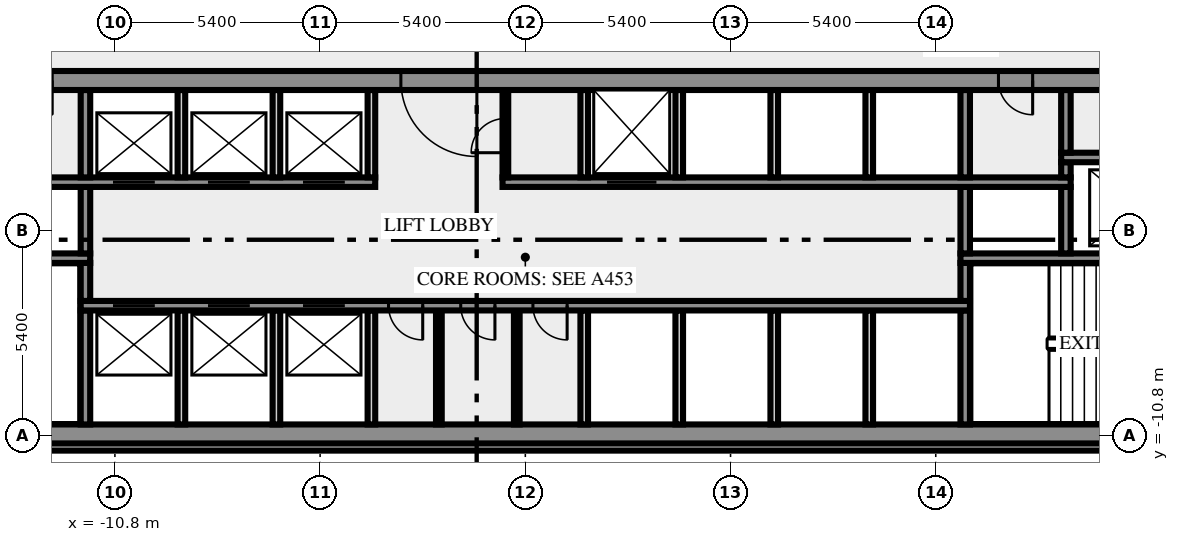
"""IFC4 building model, lengths in metres.
Left out: names, types, materials, properties, quantities, classifications, styles, units other than length and angle.
Written with IfcOpenShell. Run it as: python <this file> out.ifc"""

import sys

from ifc_helpers import new_model, si_unit, direction, frame, frame_2d, origin, place, context, subcontext, project, spatial, rectangle, extrude, element, fill, save


model = new_model("IFC4")
c1 = context("Model", 3, precision=1e-05, world=origin(), true_north=direction((0.0, 1.0)))
c2 = subcontext(c1, "Body", "Model", "MODEL_VIEW")
j1 = project(units=[si_unit("LENGTHUNIT", "METRE"), si_unit("PLANEANGLEUNIT", "RADIAN")], contexts=[c1])
p1 = place(None, origin())
s1 = spatial("IfcSite", under=j1, at=p1, CompositionType="ELEMENT")
p2 = place(p1, origin())
s2 = spatial("IfcBuilding", under=s1, at=p2, CompositionType="ELEMENT")
p3 = place(p2, frame((0.0, 0.0, 39.0)))
s3 = spatial("IfcBuildingStorey", under=s2, at=p3, CompositionType="ELEMENT", Elevation=39.0)
p4 = place(p3, frame((-17.444, -11.088, 0.0), z_axis=(0.0, 0.0, 1.0), x_axis=(1.0, 0.0, 0.0)))
e1 = element("IfcWall", 1, at=p4, inside=s3, PredefinedType="SOLIDWALL", context=c2, shape_type="SweptSolid", body=[
    extrude(rectangle(XDim=34.888, YDim=0.2, at=frame_2d((17.444, 0.0))), origin(), (0.0, 0.0, 1.0), 3.65),
])
p5 = place(p3, frame((-20.0, -10.75, 0.0), z_axis=(0.0, 0.0, 1.0), x_axis=(1.0, 0.0, 0.0)))
e2 = element("IfcWall", 2, at=p5, inside=s3, PredefinedType="SHEAR", context=c2, shape_type="SweptSolid", body=[
    extrude(rectangle(XDim=40.0, YDim=0.5, at=frame_2d((20.0, 0.0))), origin(), (0.0, 0.0, 1.0), 3.65),
])
p6 = place(p5, frame((0.8, 0.0, 1.0)))
e3 = element("IfcOpeningElement", 3, at=p6, cuts=e2, PredefinedType="OPENING", context=c2, shape_type="SweptSolid", body=[
    extrude(rectangle(XDim=1.2, YDim=1.2, at=frame_2d((0.6, 0.6))), frame((0.0, 0.26, 0.0), z_axis=(0.0, -1.0, 0.0), x_axis=(1.0, 0.0, 0.0)), (0.0, 0.0, 1.0), 0.52),
])
p7 = place(p5, frame((38.0, 0.0, 1.0)))
e4 = element("IfcOpeningElement", 4, at=p7, cuts=e2, PredefinedType="OPENING", context=c2, shape_type="SweptSolid", body=[
    extrude(rectangle(XDim=1.2, YDim=1.2, at=frame_2d((0.6, 0.6))), frame((0.0, 0.26, 0.0), z_axis=(0.0, -1.0, 0.0), x_axis=(1.0, 0.0, 0.0)), (0.0, 0.0, 1.0), 0.52),
])
p8 = place(p3, frame((-11.575, -10.5, 0.0), z_axis=(0.0, 0.0, 1.0), x_axis=(0.0, 1.0, 0.0)))
e5 = element("IfcWall", 5, at=p8, inside=s3, PredefinedType="SHEAR", context=c2, shape_type="SweptSolid", body=[
    extrude(rectangle(XDim=3.0, YDim=0.25, at=frame_2d((1.5, 0.0))), origin(), (0.0, 0.0, 1.0), 3.65),
])
for number, where, z_axis, x_axis in (
    (6, (-9.05, -10.5, 0.0), (0.0, 0.0, 1.0), (0.0, 1.0, 0.0)),
    (7, (-6.55, -10.5, 0.0), (0.0, 0.0, 1.0), (0.0, 1.0, 0.0)),
    (8, (-4.05, -10.5, 0.0), (0.0, 0.0, 1.0), (0.0, 1.0, 0.0)),
):
    element("IfcWall", number, at=place(p3, frame(where, z_axis=z_axis, x_axis=x_axis)), inside=s3, PredefinedType="SOLIDWALL", context=c2, shape_type="SweptSolid", body=[
        extrude(rectangle(XDim=3.0, YDim=0.2, at=frame_2d((1.5, 0.0))), origin(), (0.0, 0.0, 1.0), 3.65),
    ])
for number, where, z_axis, x_axis in (
    (9, (-2.275, -10.5, 0.0), (0.0, 0.0, 1.0), (0.0, 1.0, 0.0)),
    (10, (-0.225, -10.5, 0.0), (0.0, 0.0, 1.0), (0.0, 1.0, 0.0)),
):
    element("IfcWall", number, at=place(p3, frame(where, z_axis=z_axis, x_axis=x_axis)), inside=s3, PredefinedType="PARTITIONING", context=c2, shape_type="SweptSolid", body=[
        extrude(rectangle(XDim=3.0, YDim=0.15, at=frame_2d((1.5, 0.0))), origin(), (0.0, 0.0, 1.0), 3.65),
    ])
for number, where, z_axis, x_axis in (
    (11, (1.55, -10.5, 0.0), (0.0, 0.0, 1.0), (0.0, 1.0, 0.0)),
    (12, (4.05, -10.5, 0.0), (0.0, 0.0, 1.0), (0.0, 1.0, 0.0)),
    (13, (6.55, -10.5, 0.0), (0.0, 0.0, 1.0), (0.0, 1.0, 0.0)),
    (14, (9.05, -10.5, 0.0), (0.0, 0.0, 1.0), (0.0, 1.0, 0.0)),
):
    element("IfcWall", number, at=place(p3, frame(where, z_axis=z_axis, x_axis=x_axis)), inside=s3, PredefinedType="SOLIDWALL", context=c2, shape_type="SweptSolid", body=[
        extrude(rectangle(XDim=3.0, YDim=0.2, at=frame_2d((1.5, 0.0))), origin(), (0.0, 0.0, 1.0), 3.65),
    ])
p9 = place(p3, frame((11.575, -10.5, 0.0), z_axis=(0.0, 0.0, 1.0), x_axis=(0.0, 1.0, 0.0)))
e15 = element("IfcWall", 15, at=p9, inside=s3, PredefinedType="SHEAR", context=c2, shape_type="SweptSolid", body=[
    extrude(rectangle(XDim=3.0, YDim=0.25, at=frame_2d((1.5, 0.0))), origin(), (0.0, 0.0, 1.0), 3.65),
])
p10 = place(p3, frame((11.7, -7.375, 0.0), z_axis=(0.0, 0.0, 1.0), x_axis=(-1.0, 0.0, 0.0)))
e16 = element("IfcWall", 16, at=p10, inside=s3, PredefinedType="SHEAR", context=c2, shape_type="SweptSolid", body=[
    extrude(rectangle(XDim=23.4, YDim=0.25, at=frame_2d((11.7, 0.0))), origin(), (0.0, 0.0, 1.0), 3.65),
])
p11 = place(p10, frame((21.45, 0.0, 0.0)))
e17 = element("IfcOpeningElement", 17, at=p11, cuts=e16, PredefinedType="OPENING", context=c2, shape_type="SweptSolid", body=[
    extrude(rectangle(XDim=1.1, YDim=2.1, at=frame_2d((0.55, 1.05))), frame((0.0, 0.135, 0.0), z_axis=(0.0, -1.0, 0.0), x_axis=(1.0, 0.0, 0.0)), (0.0, 0.0, 1.0), 0.27),
])
p12 = place(p10, frame((18.95, 0.0, 0.0)))
e18 = element("IfcOpeningElement", 18, at=p12, cuts=e16, PredefinedType="OPENING", context=c2, shape_type="SweptSolid", body=[
    extrude(rectangle(XDim=1.1, YDim=2.1, at=frame_2d((0.55, 1.05))), frame((0.0, 0.135, 0.0), z_axis=(0.0, -1.0, 0.0), x_axis=(1.0, 0.0, 0.0)), (0.0, 0.0, 1.0), 0.27),
])
p13 = place(p10, frame((16.45, 0.0, 0.0)))
e19 = element("IfcOpeningElement", 19, at=p13, cuts=e16, PredefinedType="OPENING", context=c2, shape_type="SweptSolid", body=[
    extrude(rectangle(XDim=1.1, YDim=2.1, at=frame_2d((0.55, 1.05))), frame((0.0, 0.135, 0.0), z_axis=(0.0, -1.0, 0.0), x_axis=(1.0, 0.0, 0.0)), (0.0, 0.0, 1.0), 0.27),
])
p14 = place(p10, frame((14.4, 0.0, 0.0)))
e20 = element("IfcOpeningElement", 20, at=p14, cuts=e16, PredefinedType="OPENING", context=c2, shape_type="SweptSolid", body=[
    extrude(rectangle(XDim=0.9, YDim=2.1, at=frame_2d((0.45, 1.05))), frame((0.0, 0.135, 0.0), z_axis=(0.0, -1.0, 0.0), x_axis=(1.0, 0.0, 0.0)), (0.0, 0.0, 1.0), 0.27),
])
p15 = place(p10, frame((12.5, 0.0, 0.0)))
e21 = element("IfcOpeningElement", 21, at=p15, cuts=e16, PredefinedType="OPENING", context=c2, shape_type="SweptSolid", body=[
    extrude(rectangle(XDim=0.9, YDim=2.1, at=frame_2d((0.45, 1.05))), frame((0.0, 0.135, 0.0), z_axis=(0.0, -1.0, 0.0), x_axis=(1.0, 0.0, 0.0)), (0.0, 0.0, 1.0), 0.27),
])
p16 = place(p10, frame((10.6, 0.0, 0.0)))
e22 = element("IfcOpeningElement", 22, at=p16, cuts=e16, PredefinedType="OPENING", context=c2, shape_type="SweptSolid", body=[
    extrude(rectangle(XDim=0.9, YDim=2.1, at=frame_2d((0.45, 1.05))), frame((0.0, 0.135, 0.0), z_axis=(0.0, -1.0, 0.0), x_axis=(1.0, 0.0, 0.0)), (0.0, 0.0, 1.0), 0.27),
])
for number, where, z_axis, x_axis in (
    (23, (-11.575, -7.25, 0.0), (0.0, 0.0, 1.0), (0.0, 1.0, 0.0)),
    (24, (11.575, -7.25, 0.0), (0.0, 0.0, 1.0), (0.0, 1.0, 0.0)),
):
    element("IfcWall", number, at=place(p3, frame(where, z_axis=z_axis, x_axis=x_axis)), inside=s3, PredefinedType="SHEAR", context=c2, shape_type="SweptSolid", body=[
        extrude(rectangle(XDim=1.0, YDim=0.25, at=frame_2d((0.5, 0.0))), origin(), (0.0, 0.0, 1.0), 3.65),
    ])
p17 = place(p3, frame((-11.45, -6.125, 0.0), z_axis=(0.0, 0.0, 1.0), x_axis=(-1.0, 0.0, 0.0)))
e25 = element("IfcWall", 25, at=p17, inside=s3, PredefinedType="SHEAR", context=c2, shape_type="SweptSolid", body=[
    extrude(rectangle(XDim=8.05, YDim=0.25, at=frame_2d((4.025, 0.0))), origin(), (0.0, 0.0, 1.0), 3.65),
])
p18 = place(p17, frame((6.2, 0.0, 0.0)))
e26 = element("IfcOpeningElement", 26, at=p18, cuts=e25, PredefinedType="OPENING", context=c2, shape_type="SweptSolid", body=[
    extrude(rectangle(XDim=1.8, YDim=2.1, at=frame_2d((0.9, 1.05))), frame((0.0, 0.135, 0.0), z_axis=(0.0, -1.0, 0.0), x_axis=(1.0, 0.0, 0.0)), (0.0, 0.0, 1.0), 0.27),
])
p19 = place(p3, frame((19.5, -6.125, 0.0), z_axis=(0.0, 0.0, 1.0), x_axis=(-1.0, 0.0, 0.0)))
e27 = element("IfcWall", 27, at=p19, inside=s3, PredefinedType="SHEAR", context=c2, shape_type="SweptSolid", body=[
    extrude(rectangle(XDim=8.05, YDim=0.25, at=frame_2d((4.025, 0.0))), origin(), (0.0, 0.0, 1.0), 3.65),
])
p20 = place(p19, frame((0.05, 0.0, 0.0)))
e28 = element("IfcOpeningElement", 28, at=p20, cuts=e27, PredefinedType="OPENING", context=c2, shape_type="SweptSolid", body=[
    extrude(rectangle(XDim=1.8, YDim=2.1, at=frame_2d((0.9, 1.05))), frame((0.0, 0.135, 0.0), z_axis=(0.0, -1.0, 0.0), x_axis=(1.0, 0.0, 0.0)), (0.0, 0.0, 1.0), 0.27),
])
for number, where, z_axis, x_axis in (
    (29, (-11.575, -6.0, 0.0), (0.0, 0.0, 1.0), (0.0, 1.0, 0.0)),
    (30, (11.575, -6.0, 0.0), (0.0, 0.0, 1.0), (0.0, 1.0, 0.0)),
    (31, (14.225, -6.0, 0.0), (0.0, 0.0, 1.0), (0.0, 1.0, 0.0)),
):
    element("IfcWall", number, at=place(p3, frame(where, z_axis=z_axis, x_axis=x_axis)), inside=s3, PredefinedType="SHEAR", context=c2, shape_type="SweptSolid", body=[
        extrude(rectangle(XDim=1.75, YDim=0.25, at=frame_2d((0.875, 0.0))), origin(), (0.0, 0.0, 1.0), 3.65),
    ])
p21 = place(p3, frame((-14.35, -4.125, 0.0), z_axis=(0.0, 0.0, 1.0), x_axis=(1.0, 0.0, 0.0)))
e32 = element("IfcWall", 32, at=p21, inside=s3, PredefinedType="SHEAR", context=c2, shape_type="SweptSolid", body=[
    extrude(rectangle(XDim=10.4, YDim=0.25, at=frame_2d((5.2, 0.0))), origin(), (0.0, 0.0, 1.0), 3.65),
])
p22 = place(p21, frame((3.5, 0.0, 0.0)))
e33 = element("IfcOpeningElement", 33, at=p22, cuts=e32, PredefinedType="OPENING", context=c2, shape_type="SweptSolid", body=[
    extrude(rectangle(XDim=1.1, YDim=2.1, at=frame_2d((0.55, 1.05))), frame((0.0, 0.135, 0.0), z_axis=(0.0, -1.0, 0.0), x_axis=(1.0, 0.0, 0.0)), (0.0, 0.0, 1.0), 0.27),
])
p23 = place(p21, frame((6.0, 0.0, 0.0)))
e34 = element("IfcOpeningElement", 34, at=p23, cuts=e32, PredefinedType="OPENING", context=c2, shape_type="SweptSolid", body=[
    extrude(rectangle(XDim=1.1, YDim=2.1, at=frame_2d((0.55, 1.05))), frame((0.0, 0.135, 0.0), z_axis=(0.0, -1.0, 0.0), x_axis=(1.0, 0.0, 0.0)), (0.0, 0.0, 1.0), 0.27),
])
p24 = place(p21, frame((8.5, 0.0, 0.0)))
e35 = element("IfcOpeningElement", 35, at=p24, cuts=e32, PredefinedType="OPENING", context=c2, shape_type="SweptSolid", body=[
    extrude(rectangle(XDim=1.1, YDim=2.1, at=frame_2d((0.55, 1.05))), frame((0.0, 0.135, 0.0), z_axis=(0.0, -1.0, 0.0), x_axis=(1.0, 0.0, 0.0)), (0.0, 0.0, 1.0), 0.27),
])
p25 = place(p3, frame((-0.6, -4.125, 0.0), z_axis=(0.0, 0.0, 1.0), x_axis=(1.0, 0.0, 0.0)))
e36 = element("IfcWall", 36, at=p25, inside=s3, PredefinedType="SHEAR", context=c2, shape_type="SweptSolid", body=[
    extrude(rectangle(XDim=14.95, YDim=0.25, at=frame_2d((7.475, 0.0))), origin(), (0.0, 0.0, 1.0), 3.65),
])
p26 = place(p25, frame((2.75, 0.0, 0.0)))
e37 = element("IfcOpeningElement", 37, at=p26, cuts=e36, PredefinedType="OPENING", context=c2, shape_type="SweptSolid", body=[
    extrude(rectangle(XDim=1.3, YDim=2.1, at=frame_2d((0.65, 1.05))), frame((0.0, 0.135, 0.0), z_axis=(0.0, -1.0, 0.0), x_axis=(1.0, 0.0, 0.0)), (0.0, 0.0, 1.0), 0.27),
])
p27 = place(p3, frame((-11.575, -4.0, 0.0), z_axis=(0.0, 0.0, 1.0), x_axis=(0.0, 1.0, 0.0)))
e38 = element("IfcWall", 38, at=p27, inside=s3, PredefinedType="SHEAR", context=c2, shape_type="SweptSolid", body=[
    extrude(rectangle(XDim=2.3, YDim=0.25, at=frame_2d((1.15, 0.0))), origin(), (0.0, 0.0, 1.0), 3.65),
])
for number, where, z_axis, x_axis in (
    (39, (-9.05, -4.0, 0.0), (0.0, 0.0, 1.0), (0.0, 1.0, 0.0)),
    (40, (-6.55, -4.0, 0.0), (0.0, 0.0, 1.0), (0.0, 1.0, 0.0)),
    (41, (-4.05, -4.0, 0.0), (0.0, 0.0, 1.0), (0.0, 1.0, 0.0)),
):
    element("IfcWall", number, at=place(p3, frame(where, z_axis=z_axis, x_axis=x_axis)), inside=s3, PredefinedType="SOLIDWALL", context=c2, shape_type="SweptSolid", body=[
        extrude(rectangle(XDim=2.3, YDim=0.2, at=frame_2d((1.15, 0.0))), origin(), (0.0, 0.0, 1.0), 3.65),
    ])
p28 = place(p3, frame((-0.525, -4.0, 0.0), z_axis=(0.0, 0.0, 1.0), x_axis=(0.0, 1.0, 0.0)))
e42 = element("IfcWall", 42, at=p28, inside=s3, PredefinedType="PARTITIONING", context=c2, shape_type="SweptSolid", body=[
    extrude(rectangle(XDim=2.3, YDim=0.15, at=frame_2d((1.15, 0.0))), origin(), (0.0, 0.0, 1.0), 3.65),
])
p29 = place(p28, frame((0.65, 0.0, 0.0)))
e43 = element("IfcOpeningElement", 43, at=p29, cuts=e42, PredefinedType="OPENING", context=c2, shape_type="SweptSolid", body=[
    extrude(rectangle(XDim=0.9, YDim=2.1, at=frame_2d((0.45, 1.05))), frame((0.0, 0.085, 0.0), z_axis=(0.0, -1.0, 0.0), x_axis=(1.0, 0.0, 0.0)), (0.0, 0.0, 1.0), 0.17),
])
for number, where, z_axis, x_axis in (
    (44, (1.55, -4.0, 0.0), (0.0, 0.0, 1.0), (0.0, 1.0, 0.0)),
    (45, (4.05, -4.0, 0.0), (0.0, 0.0, 1.0), (0.0, 1.0, 0.0)),
    (46, (6.55, -4.0, 0.0), (0.0, 0.0, 1.0), (0.0, 1.0, 0.0)),
    (47, (9.05, -4.0, 0.0), (0.0, 0.0, 1.0), (0.0, 1.0, 0.0)),
):
    element("IfcWall", number, at=place(p3, frame(where, z_axis=z_axis, x_axis=x_axis)), inside=s3, PredefinedType="SOLIDWALL", context=c2, shape_type="SweptSolid", body=[
        extrude(rectangle(XDim=2.3, YDim=0.2, at=frame_2d((1.15, 0.0))), origin(), (0.0, 0.0, 1.0), 3.65),
    ])
p30 = place(p3, frame((11.575, -4.0, 0.0), z_axis=(0.0, 0.0, 1.0), x_axis=(0.0, 1.0, 0.0)))
e48 = element("IfcWall", 48, at=p30, inside=s3, PredefinedType="SHEAR", context=c2, shape_type="SweptSolid", body=[
    extrude(rectangle(XDim=2.3, YDim=0.25, at=frame_2d((1.15, 0.0))), origin(), (0.0, 0.0, 1.0), 3.65),
])
p31 = place(p3, frame((14.225, -4.0, 0.0), z_axis=(0.0, 0.0, 1.0), x_axis=(0.0, 1.0, 0.0)))
e49 = element("IfcWall", 49, at=p31, inside=s3, PredefinedType="SHEAR", context=c2, shape_type="SweptSolid", body=[
    extrude(rectangle(XDim=0.4, YDim=0.25, at=frame_2d((0.2, 0.0))), origin(), (0.0, 0.0, 1.0), 3.65),
])
p32 = place(p3, frame((14.1, -3.475, 0.0), z_axis=(0.0, 0.0, 1.0), x_axis=(1.0, 0.0, 0.0)))
e50 = element("IfcWall", 50, at=p32, inside=s3, PredefinedType="SHEAR", context=c2, shape_type="SweptSolid", body=[
    extrude(rectangle(XDim=3.25, YDim=0.25, at=frame_2d((1.625, 0.0))), origin(), (0.0, 0.0, 1.0), 3.65),
])
p33 = place(p3, frame((14.225, -3.35, 0.0), z_axis=(0.0, 0.0, 1.0), x_axis=(0.0, 1.0, 0.0)))
e51 = element("IfcWall", 51, at=p33, inside=s3, PredefinedType="SHEAR", context=c2, shape_type="SweptSolid", body=[
    extrude(rectangle(XDim=1.65, YDim=0.25, at=frame_2d((0.825, 0.0))), origin(), (0.0, 0.0, 1.0), 3.65),
])
p34 = place(p3, frame((20.49, -1.45, 0.0), z_axis=(0.0, 0.0, 1.0), x_axis=(-1.0, 0.0, 0.0)))
e52 = element("IfcWall", 52, at=p34, inside=s3, PredefinedType="SHEAR", context=c2, shape_type="SweptSolid", body=[
    extrude(rectangle(XDim=40.98, YDim=0.5, at=frame_2d((20.49, 0.0))), origin(), (0.0, 0.0, 1.0), 3.65),
])
p35 = place(p34, frame((38.14, 0.0, 0.0)))
e53 = element("IfcOpeningElement", 53, at=p35, cuts=e52, PredefinedType="OPENING", context=c2, shape_type="SweptSolid", body=[
    extrude(rectangle(XDim=1.8, YDim=2.1, at=frame_2d((0.9, 1.05))), frame((0.0, 0.26, 0.0), z_axis=(0.0, -1.0, 0.0), x_axis=(1.0, 0.0, 0.0)), (0.0, 0.0, 1.0), 0.52),
])
p36 = place(p34, frame((36.728, 0.0, 0.0)))
e54 = element("IfcOpeningElement", 54, at=p36, cuts=e52, PredefinedType="OPENING", context=c2, shape_type="SweptSolid", body=[
    extrude(rectangle(XDim=0.8, YDim=2.1, at=frame_2d((0.4, 1.05))), frame((0.0, 0.26, 0.0), z_axis=(0.0, -1.0, 0.0), x_axis=(1.0, 0.0, 0.0)), (0.0, 0.0, 1.0), 0.52),
])
p37 = place(p34, frame((35.153, 0.0, 0.0)))
e55 = element("IfcOpeningElement", 55, at=p37, cuts=e52, PredefinedType="OPENING", context=c2, shape_type="SweptSolid", body=[
    extrude(rectangle(XDim=0.8, YDim=2.1, at=frame_2d((0.4, 1.05))), frame((0.0, 0.26, 0.0), z_axis=(0.0, -1.0, 0.0), x_axis=(1.0, 0.0, 0.0)), (0.0, 0.0, 1.0), 0.52),
])
p38 = place(p34, frame((32.94, 0.0, 0.0)))
e56 = element("IfcOpeningElement", 56, at=p38, cuts=e52, PredefinedType="OPENING", context=c2, shape_type="SweptSolid", body=[
    extrude(rectangle(XDim=0.9, YDim=2.1, at=frame_2d((0.45, 1.05))), frame((0.0, 0.26, 0.0), z_axis=(0.0, -1.0, 0.0), x_axis=(1.0, 0.0, 0.0)), (0.0, 0.0, 1.0), 0.52),
])
p39 = place(p34, frame((21.765, 0.0, 0.0)))
e57 = element("IfcOpeningElement", 57, at=p39, cuts=e52, PredefinedType="OPENING", context=c2, shape_type="SweptSolid", body=[
    extrude(rectangle(XDim=2.0, YDim=2.1, at=frame_2d((1.0, 1.05))), frame((0.0, 0.26, 0.0), z_axis=(0.0, -1.0, 0.0), x_axis=(1.0, 0.0, 0.0)), (0.0, 0.0, 1.0), 0.52),
])
p40 = place(p34, frame((7.14, 0.0, 0.0)))
e58 = element("IfcOpeningElement", 58, at=p40, cuts=e52, PredefinedType="OPENING", context=c2, shape_type="SweptSolid", body=[
    extrude(rectangle(XDim=0.9, YDim=2.1, at=frame_2d((0.45, 1.05))), frame((0.0, 0.26, 0.0), z_axis=(0.0, -1.0, 0.0), x_axis=(1.0, 0.0, 0.0)), (0.0, 0.0, 1.0), 0.52),
])
p41 = place(p34, frame((4.19, 0.0, 0.0)))
e59 = element("IfcOpeningElement", 59, at=p41, cuts=e52, PredefinedType="OPENING", context=c2, shape_type="SweptSolid", body=[
    extrude(rectangle(XDim=0.9, YDim=2.1, at=frame_2d((0.45, 1.05))), frame((0.0, 0.26, 0.0), z_axis=(0.0, -1.0, 0.0), x_axis=(1.0, 0.0, 0.0)), (0.0, 0.0, 1.0), 0.52),
])
p42 = place(p34, frame((1.04, 0.0, 0.0)))
e60 = element("IfcOpeningElement", 60, at=p42, cuts=e52, PredefinedType="OPENING", context=c2, shape_type="SweptSolid", body=[
    extrude(rectangle(XDim=1.8, YDim=2.1, at=frame_2d((0.9, 1.05))), frame((0.0, 0.26, 0.0), z_axis=(0.0, -1.0, 0.0), x_axis=(1.0, 0.0, 0.0)), (0.0, 0.0, 1.0), 0.52),
])
p43 = place(p11, origin())
e61 = element("IfcDoor", 61, at=p43, inside=s3, OperationType="DOUBLE_DOOR_SLIDING", PredefinedType="DOOR", context=c2, shape_type="SweptSolid", body=[
    extrude(rectangle(XDim=1.1, YDim=2.1, at=frame_2d((0.55, 1.05))), frame((0.0, 0.025, 0.0), z_axis=(0.0, -1.0, 0.0), x_axis=(1.0, 0.0, 0.0)), (0.0, 0.0, 1.0), 0.05),
])
fill(e17, e61)
p44 = place(p12, origin())
e62 = element("IfcDoor", 62, at=p44, inside=s3, OperationType="DOUBLE_DOOR_SLIDING", PredefinedType="DOOR", context=c2, shape_type="SweptSolid", body=[
    extrude(rectangle(XDim=1.1, YDim=2.1, at=frame_2d((0.55, 1.05))), frame((0.0, 0.025, 0.0), z_axis=(0.0, -1.0, 0.0), x_axis=(1.0, 0.0, 0.0)), (0.0, 0.0, 1.0), 0.05),
])
fill(e18, e62)
p45 = place(p13, origin())
e63 = element("IfcDoor", 63, at=p45, inside=s3, OperationType="DOUBLE_DOOR_SLIDING", PredefinedType="DOOR", context=c2, shape_type="SweptSolid", body=[
    extrude(rectangle(XDim=1.1, YDim=2.1, at=frame_2d((0.55, 1.05))), frame((0.0, 0.025, 0.0), z_axis=(0.0, -1.0, 0.0), x_axis=(1.0, 0.0, 0.0)), (0.0, 0.0, 1.0), 0.05),
])
fill(e19, e63)
p46 = place(p14, origin())
e64 = element("IfcDoor", 64, at=p46, inside=s3, OperationType="SINGLE_SWING_RIGHT", PredefinedType="DOOR", context=c2, shape_type="SweptSolid", body=[
    extrude(rectangle(XDim=0.9, YDim=2.1, at=frame_2d((0.45, 1.05))), frame((0.0, 0.025, 0.0), z_axis=(0.0, -1.0, 0.0), x_axis=(1.0, 0.0, 0.0)), (0.0, 0.0, 1.0), 0.05),
])
fill(e20, e64)
p47 = place(p15, origin())
e65 = element("IfcDoor", 65, at=p47, inside=s3, OperationType="SINGLE_SWING_RIGHT", PredefinedType="DOOR", context=c2, shape_type="SweptSolid", body=[
    extrude(rectangle(XDim=0.9, YDim=2.1, at=frame_2d((0.45, 1.05))), frame((0.0, 0.025, 0.0), z_axis=(0.0, -1.0, 0.0), x_axis=(1.0, 0.0, 0.0)), (0.0, 0.0, 1.0), 0.05),
])
fill(e21, e65)
p48 = place(p16, origin())
e66 = element("IfcDoor", 66, at=p48, inside=s3, OperationType="SINGLE_SWING_LEFT", PredefinedType="DOOR", context=c2, shape_type="SweptSolid", body=[
    extrude(rectangle(XDim=0.9, YDim=2.1, at=frame_2d((0.45, 1.05))), frame((0.0, 0.025, 0.0), z_axis=(0.0, -1.0, 0.0), x_axis=(1.0, 0.0, 0.0)), (0.0, 0.0, 1.0), 0.05),
])
fill(e22, e66)
p49 = place(p22, origin())
e67 = element("IfcDoor", 67, at=p49, inside=s3, OperationType="DOUBLE_DOOR_SLIDING", PredefinedType="DOOR", context=c2, shape_type="SweptSolid", body=[
    extrude(rectangle(XDim=1.1, YDim=2.1, at=frame_2d((0.55, 1.05))), frame((0.0, 0.025, 0.0), z_axis=(0.0, -1.0, 0.0), x_axis=(1.0, 0.0, 0.0)), (0.0, 0.0, 1.0), 0.05),
])
fill(e33, e67)
p50 = place(p23, origin())
e68 = element("IfcDoor", 68, at=p50, inside=s3, OperationType="DOUBLE_DOOR_SLIDING", PredefinedType="DOOR", context=c2, shape_type="SweptSolid", body=[
    extrude(rectangle(XDim=1.1, YDim=2.1, at=frame_2d((0.55, 1.05))), frame((0.0, 0.025, 0.0), z_axis=(0.0, -1.0, 0.0), x_axis=(1.0, 0.0, 0.0)), (0.0, 0.0, 1.0), 0.05),
])
fill(e34, e68)
p51 = place(p24, origin())
e69 = element("IfcDoor", 69, at=p51, inside=s3, OperationType="DOUBLE_DOOR_SLIDING", PredefinedType="DOOR", context=c2, shape_type="SweptSolid", body=[
    extrude(rectangle(XDim=1.1, YDim=2.1, at=frame_2d((0.55, 1.05))), frame((0.0, 0.025, 0.0), z_axis=(0.0, -1.0, 0.0), x_axis=(1.0, 0.0, 0.0)), (0.0, 0.0, 1.0), 0.05),
])
fill(e35, e69)
p52 = place(p26, origin())
e70 = element("IfcDoor", 70, at=p52, inside=s3, OperationType="DOUBLE_DOOR_SLIDING", PredefinedType="DOOR", context=c2, shape_type="SweptSolid", body=[
    extrude(rectangle(XDim=1.3, YDim=2.1, at=frame_2d((0.65, 1.05))), frame((0.0, 0.025, 0.0), z_axis=(0.0, -1.0, 0.0), x_axis=(1.0, 0.0, 0.0)), (0.0, 0.0, 1.0), 0.05),
])
fill(e37, e70)
p53 = place(p29, origin())
e71 = element("IfcDoor", 71, at=p53, inside=s3, OperationType="SINGLE_SWING_LEFT", PredefinedType="DOOR", context=c2, shape_type="SweptSolid", body=[
    extrude(rectangle(XDim=0.9, YDim=2.1, at=frame_2d((0.45, 1.05))), frame((0.0, 0.025, 0.0), z_axis=(0.0, -1.0, 0.0), x_axis=(1.0, 0.0, 0.0)), (0.0, 0.0, 1.0), 0.05),
])
fill(e43, e71)
p54 = place(p39, origin())
e72 = element("IfcDoor", 72, at=p54, inside=s3, OperationType="DOUBLE_DOOR_SINGLE_SWING", PredefinedType="DOOR", context=c2, shape_type="SweptSolid", body=[
    extrude(rectangle(XDim=2.0, YDim=2.1, at=frame_2d((1.0, 1.05))), frame((0.0, 0.025, 0.0), z_axis=(0.0, -1.0, 0.0), x_axis=(1.0, 0.0, 0.0)), (0.0, 0.0, 1.0), 0.05),
])
fill(e57, e72)
p55 = place(p40, origin())
e73 = element("IfcDoor", 73, at=p55, inside=s3, OperationType="SINGLE_SWING_LEFT", PredefinedType="DOOR", context=c2, shape_type="SweptSolid", body=[
    extrude(rectangle(XDim=0.9, YDim=2.1, at=frame_2d((0.45, 1.05))), frame((0.0, 0.025, 0.0), z_axis=(0.0, -1.0, 0.0), x_axis=(1.0, 0.0, 0.0)), (0.0, 0.0, 1.0), 0.05),
])
fill(e58, e73)
save(model, sys.argv[1])
